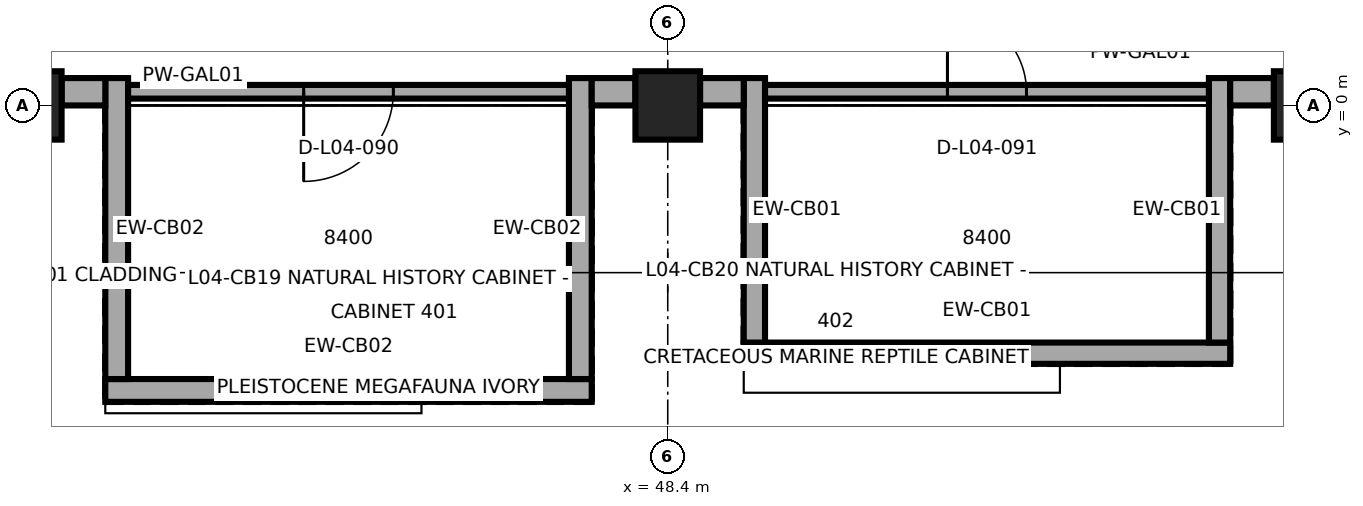
"""IFC4 building model, lengths in metres.
Left out: names, types, materials, properties, quantities, classifications, styles, units other than length and angle.
Written with IfcOpenShell. Run it as: python <this file> out.ifc"""

import sys

from ifc_helpers import new_model, si_unit, direction, frame, frame_2d, origin, origin_2d, place, context, subcontext, project, spatial, rectangle, extrude, element, fill, save


model = new_model("IFC4")
c1 = context("Model", 3, precision=1e-05, world=origin(), true_north=direction((0.0, 1.0)))
c2 = subcontext(c1, "Body", "Model", "MODEL_VIEW")
j1 = project(units=[si_unit("LENGTHUNIT", "METRE"), si_unit("PLANEANGLEUNIT", "RADIAN")], contexts=[c1])
p1 = place(None, origin())
s1 = spatial("IfcSite", under=j1, at=p1, CompositionType="ELEMENT")
p2 = place(p1, origin())
s2 = spatial("IfcBuilding", under=s1, at=p2, CompositionType="ELEMENT")
p3 = place(p2, frame((0.0, 0.0, 21.9)))
s3 = spatial("IfcBuildingStorey", under=s2, at=p3, CompositionType="ELEMENT", Elevation=21.9)
for number, where, z_axis, x_axis in (
    (1, (40.0, 0.0, 0.0), (0.0, 0.0, 1.0), (1.0, 0.0, 0.0)),
    (2, (48.4, 0.0, 0.0), (0.0, 0.0, 1.0), (1.0, 0.0, 0.0)),
    (3, (56.8, 0.0, 0.0), (0.0, 0.0, 1.0), (1.0, 0.0, 0.0)),
):
    element("IfcColumn", number, at=place(p3, frame(where, z_axis=z_axis, x_axis=x_axis)), inside=s3, PredefinedType="COLUMN", context=c2, shape_type="SweptSolid", body=[
        extrude(rectangle(XDim=0.85, YDim=0.9, at=origin_2d()), origin(), (0.0, 0.0, 1.0), 4.5),
    ])
p4 = place(p3, frame((41.0, -3.75, 0.0), z_axis=(0.0, 0.0, 1.0), x_axis=(1.0, 0.0, 0.0)))
e4 = element("IfcWall", 4, at=p4, inside=s3, PredefinedType="SOLIDWALL", context=c2, shape_type="SweptSolid", body=[
    extrude(rectangle(XDim=6.4, YDim=0.3, at=frame_2d((3.2, 0.0))), origin(), (0.0, 0.0, 1.0), 2.99),
])
for number, where, z_axis, x_axis in (
    (5, (41.15, 0.36, 0.0), (0.0, 0.0, 1.0), (0.0, -1.0, 0.0)),
    (6, (47.25, -3.6, 0.0), (0.0, 0.0, 1.0), (0.0, 1.0, 0.0)),
):
    element("IfcWall", number, at=place(p3, frame(where, z_axis=z_axis, x_axis=x_axis)), inside=s3, PredefinedType="SOLIDWALL", context=c2, shape_type="SweptSolid", body=[
        extrude(rectangle(XDim=3.96, YDim=0.3, at=frame_2d((1.98, 0.0))), origin(), (0.0, 0.0, 1.0), 2.99),
    ])
p5 = place(p3, frame((49.4, -3.26, 0.0), z_axis=(0.0, 0.0, 1.0), x_axis=(1.0, 0.0, 0.0)))
e7 = element("IfcWall", 7, at=p5, inside=s3, PredefinedType="SOLIDWALL", context=c2, shape_type="SweptSolid", body=[
    extrude(rectangle(XDim=6.4, YDim=0.28, at=frame_2d((3.2, 0.0))), origin(), (0.0, 0.0, 1.0), 2.99),
])
for number, where, z_axis, x_axis in (
    (8, (49.54, 0.36, 0.0), (0.0, 0.0, 1.0), (0.0, -1.0, 0.0)),
    (9, (55.66, -3.12, 0.0), (0.0, 0.0, 1.0), (0.0, 1.0, 0.0)),
):
    element("IfcWall", number, at=place(p3, frame(where, z_axis=z_axis, x_axis=x_axis)), inside=s3, PredefinedType="SOLIDWALL", context=c2, shape_type="SweptSolid", body=[
        extrude(rectangle(XDim=3.48, YDim=0.28, at=frame_2d((1.74, 0.0))), origin(), (0.0, 0.0, 1.0), 2.99),
    ])
p6 = place(p3, frame((40.425, 0.18, 0.0), z_axis=(0.0, 0.0, 1.0), x_axis=(1.0, 0.0, 0.0)))
e10 = element("IfcWall", 10, at=p6, inside=s3, PredefinedType="SOLIDWALL", context=c2, shape_type="SweptSolid", body=[
    extrude(rectangle(XDim=0.575, YDim=0.36, at=frame_2d((0.288, 0.0))), origin(), (0.0, 0.0, 1.0), 3.335),
])
p7 = place(p3, frame((47.4, 0.18, 0.0), z_axis=(0.0, 0.0, 1.0), x_axis=(1.0, 0.0, 0.0)))
e11 = element("IfcWall", 11, at=p7, inside=s3, PredefinedType="SOLIDWALL", context=c2, shape_type="SweptSolid", body=[
    extrude(rectangle(XDim=0.575, YDim=0.36, at=frame_2d((0.288, 0.0))), origin(), (0.0, 0.0, 1.0), 3.335),
])
for number, where, z_axis, x_axis in (
    (12, (48.825, 0.18, 0.0), (0.0, 0.0, 1.0), (1.0, 0.0, 0.0)),
    (13, (55.8, 0.18, 0.0), (0.0, 0.0, 1.0), (1.0, 0.0, 0.0)),
):
    element("IfcWall", number, at=place(p3, frame(where, z_axis=z_axis, x_axis=x_axis)), inside=s3, PredefinedType="SOLIDWALL", context=c2, shape_type="SweptSolid", body=[
        extrude(rectangle(XDim=0.575, YDim=0.36, at=frame_2d((0.288, 0.0))), origin(), (0.0, 0.0, 1.0), 3.335),
    ])
p8 = place(p3, frame((41.3, 0.18, 0.0), z_axis=(0.0, 0.0, 1.0), x_axis=(1.0, 0.0, 0.0)))
e14 = element("IfcWall", 14, at=p8, inside=s3, PredefinedType="PARTITIONING", context=c2, shape_type="SweptSolid", body=[
    extrude(rectangle(XDim=5.8, YDim=0.18, at=frame_2d((2.9, 0.0))), origin(), (0.0, 0.0, 1.0), 2.99),
])
p9 = place(p8, frame((2.31, 0.0, 0.0)))
e15 = element("IfcOpeningElement", 15, at=p9, cuts=e14, PredefinedType="OPENING", context=c2, shape_type="SweptSolid", body=[
    extrude(rectangle(XDim=1.18, YDim=2.25, at=frame_2d((0.59, 1.125))), frame((0.0, 0.1, 0.0), z_axis=(0.0, -1.0, 0.0), x_axis=(1.0, 0.0, 0.0)), (0.0, 0.0, 1.0), 0.2),
])
p10 = place(p3, frame((49.68, 0.18, 0.0), z_axis=(0.0, 0.0, 1.0), x_axis=(1.0, 0.0, 0.0)))
e16 = element("IfcWall", 16, at=p10, inside=s3, PredefinedType="PARTITIONING", context=c2, shape_type="SweptSolid", body=[
    extrude(rectangle(XDim=5.84, YDim=0.18, at=frame_2d((2.92, 0.0))), origin(), (0.0, 0.0, 1.0), 2.99),
])
p11 = place(p10, frame((2.4, 0.0, 0.0)))
e17 = element("IfcOpeningElement", 17, at=p11, cuts=e16, PredefinedType="OPENING", context=c2, shape_type="SweptSolid", body=[
    extrude(rectangle(XDim=1.04, YDim=2.18, at=frame_2d((0.52, 1.09))), frame((0.0, 0.1, 0.0), z_axis=(0.0, -1.0, 0.0), x_axis=(1.0, 0.0, 0.0)), (0.0, 0.0, 1.0), 0.2),
])
p12 = place(p9, origin())
e18 = element("IfcDoor", 18, at=p12, inside=s3, OperationType="SINGLE_SWING_RIGHT", PredefinedType="DOOR", context=c2, shape_type="SweptSolid", body=[
    extrude(rectangle(XDim=1.18, YDim=2.25, at=frame_2d((0.59, 1.125))), frame((0.0, 0.025, 0.0), z_axis=(0.0, -1.0, 0.0), x_axis=(1.0, 0.0, 0.0)), (0.0, 0.0, 1.0), 0.05),
])
fill(e15, e18)
p13 = place(p11, origin())
e19 = element("IfcDoor", 19, at=p13, inside=s3, OperationType="SINGLE_SWING_LEFT", PredefinedType="DOOR", context=c2, shape_type="SweptSolid", body=[
    extrude(rectangle(XDim=1.04, YDim=2.18, at=frame_2d((0.52, 1.09))), frame((0.0, 0.025, 0.0), z_axis=(0.0, -1.0, 0.0), x_axis=(1.0, 0.0, 0.0)), (0.0, 0.0, 1.0), 0.05),
])
fill(e17, e19)
save(model, sys.argv[1])
